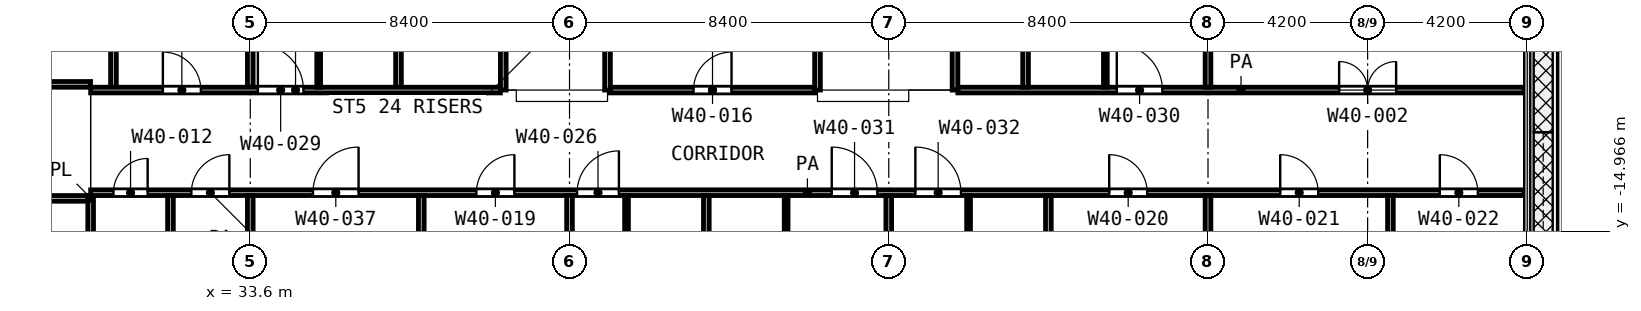
"""IFC4 building model, lengths in metres.
Left out: names, types, materials, properties, quantities, classifications, styles, units other than length and angle.
Written with IfcOpenShell. Run it as: python <this file> out.ifc"""

import sys

from ifc_helpers import new_model, si_unit, direction, frame, frame_2d, origin, place, context, subcontext, project, spatial, rectangle, extrude, element, fill, save


model = new_model("IFC4")
c1 = context("Model", 3, precision=1e-05, world=origin(), true_north=direction((0.0, 1.0)))
c2 = subcontext(c1, "Body", "Model", "MODEL_VIEW")
j1 = project(units=[si_unit("LENGTHUNIT", "METRE"), si_unit("PLANEANGLEUNIT", "RADIAN")], contexts=[c1])
p1 = place(None, origin())
s1 = spatial("IfcSite", under=j1, at=p1, CompositionType="ELEMENT")
p2 = place(p1, origin())
s2 = spatial("IfcBuilding", under=s1, at=p2, CompositionType="ELEMENT")
p3 = place(p2, frame((0.0, 0.0, 175.2)))
s3 = spatial("IfcBuildingStorey", under=s2, at=p3, CompositionType="ELEMENT", Elevation=175.2)
p4 = place(p3, frame((29.4, -14.147, 0.0), z_axis=(0.0, 0.0, 1.0), x_axis=(0.0, 1.0, 0.0)))
e1 = element("IfcWall", 1, at=p4, inside=s3, PredefinedType="PARTITIONING", context=c2, shape_type="SweptSolid", body=[
    extrude(rectangle(XDim=0.12, YDim=0.1, at=frame_2d((0.06, 0.0))), origin(), (0.0, 0.0, 1.0), 3.6),
])
for number, where, z_axis, x_axis in (
    (2, (35.4, -11.175, 0.0), (0.0, 0.0, 1.0), (0.0, 1.0, 0.0)),
    (3, (43.5, -16.65, 0.0), (0.0, 0.0, 1.0), (0.0, 1.0, 0.0)),
    (4, (47.7, -16.65, 0.0), (0.0, 0.0, 1.0), (0.0, 1.0, 0.0)),
    (5, (52.5, -16.65, 0.0), (0.0, 0.0, 1.0), (0.0, 1.0, 0.0)),
    (6, (56.1, -11.175, 0.0), (0.0, 0.0, 1.0), (0.0, 1.0, 0.0)),
):
    element("IfcWall", number, at=place(p3, frame(where, z_axis=z_axis, x_axis=x_axis)), inside=s3, PredefinedType="PARTITIONING", context=c2, shape_type="SweptSolid", body=[
        extrude(rectangle(XDim=2.625, YDim=0.1, at=frame_2d((1.312, 0.0))), origin(), (0.0, 0.0, 1.0), 3.6),
    ])
p5 = place(p3, frame((24.9, -14.1, 0.0), z_axis=(0.0, 0.0, 1.0), x_axis=(1.0, 0.0, 0.0)))
e7 = element("IfcWall", 7, at=p5, inside=s3, PredefinedType="PARTITIONING", context=c2, shape_type="SweptSolid", body=[
    extrude(rectangle(XDim=4.425, YDim=0.15, at=frame_2d((2.212, 0.0))), origin(), (0.0, 0.0, 1.0), 3.6),
])
p6 = place(p5, frame((1.65, 0.0, 0.0)))
e8 = element("IfcOpeningElement", 8, at=p6, cuts=e7, PredefinedType="OPENING", context=c2, shape_type="SweptSolid", body=[
    extrude(rectangle(XDim=1.5, YDim=2.1, at=frame_2d((0.75, 1.05))), frame((0.0, 0.085, 0.0), z_axis=(0.0, -1.0, 0.0), x_axis=(1.0, 0.0, 0.0)), (0.0, 0.0, 1.0), 0.17),
])
p7 = place(p3, frame((29.4, -13.95, 0.0), z_axis=(0.0, 0.0, 1.0), x_axis=(1.0, 0.0, 0.0)))
e9 = element("IfcWall", 9, at=p7, inside=s3, PredefinedType="PARTITIONING", context=c2, shape_type="SweptSolid", body=[
    extrude(rectangle(XDim=37.72, YDim=0.15, at=frame_2d((18.86, 0.0))), origin(), (0.0, 0.0, 1.0), 3.6),
])
p8 = place(p7, frame((10.15, 0.0, 0.0)))
e10 = element("IfcOpeningElement", 10, at=p8, cuts=e9, PredefinedType="OPENING", context=c2, shape_type="SweptSolid", body=[
    extrude(rectangle(XDim=1.0, YDim=2.1, at=frame_2d((0.5, 1.05))), frame((0.0, 0.085, 0.0), z_axis=(0.0, -1.0, 0.0), x_axis=(1.0, 0.0, 0.0)), (0.0, 0.0, 1.0), 0.17),
])
p9 = place(p7, frame((12.8, 0.0, 0.0)))
e11 = element("IfcOpeningElement", 11, at=p9, cuts=e9, PredefinedType="OPENING", context=c2, shape_type="SweptSolid", body=[
    extrude(rectangle(XDim=1.1, YDim=2.1, at=frame_2d((0.55, 1.05))), frame((0.0, 0.085, 0.0), z_axis=(0.0, -1.0, 0.0), x_axis=(1.0, 0.0, 0.0)), (0.0, 0.0, 1.0), 0.17),
])
p10 = place(p7, frame((19.5, 0.0, 0.0)))
e12 = element("IfcOpeningElement", 12, at=p10, cuts=e9, PredefinedType="OPENING", context=c2, shape_type="SweptSolid", body=[
    extrude(rectangle(XDim=1.2, YDim=2.1, at=frame_2d((0.6, 1.05))), frame((0.0, 0.085, 0.0), z_axis=(0.0, -1.0, 0.0), x_axis=(1.0, 0.0, 0.0)), (0.0, 0.0, 1.0), 0.17),
])
p11 = place(p7, frame((21.7, 0.0, 0.0)))
e13 = element("IfcOpeningElement", 13, at=p11, cuts=e9, PredefinedType="OPENING", context=c2, shape_type="SweptSolid", body=[
    extrude(rectangle(XDim=1.2, YDim=2.1, at=frame_2d((0.6, 1.05))), frame((0.0, 0.085, 0.0), z_axis=(0.0, -1.0, 0.0), x_axis=(1.0, 0.0, 0.0)), (0.0, 0.0, 1.0), 0.17),
])
p12 = place(p7, frame((26.8, 0.0, 0.0)))
e14 = element("IfcOpeningElement", 14, at=p12, cuts=e9, PredefinedType="OPENING", context=c2, shape_type="SweptSolid", body=[
    extrude(rectangle(XDim=1.0, YDim=2.1, at=frame_2d((0.5, 1.05))), frame((0.0, 0.085, 0.0), z_axis=(0.0, -1.0, 0.0), x_axis=(1.0, 0.0, 0.0)), (0.0, 0.0, 1.0), 0.17),
])
p13 = place(p7, frame((31.3, 0.0, 0.0)))
e15 = element("IfcOpeningElement", 15, at=p13, cuts=e9, PredefinedType="OPENING", context=c2, shape_type="SweptSolid", body=[
    extrude(rectangle(XDim=1.0, YDim=2.1, at=frame_2d((0.5, 1.05))), frame((0.0, 0.085, 0.0), z_axis=(0.0, -1.0, 0.0), x_axis=(1.0, 0.0, 0.0)), (0.0, 0.0, 1.0), 0.17),
])
p14 = place(p7, frame((35.5, 0.0, 0.0)))
e16 = element("IfcOpeningElement", 16, at=p14, cuts=e9, PredefinedType="OPENING", context=c2, shape_type="SweptSolid", body=[
    extrude(rectangle(XDim=1.0, YDim=2.1, at=frame_2d((0.5, 1.05))), frame((0.0, 0.085, 0.0), z_axis=(0.0, -1.0, 0.0), x_axis=(1.0, 0.0, 0.0)), (0.0, 0.0, 1.0), 0.17),
])
p15 = place(p7, frame((0.6, 0.0, 0.0)))
e17 = element("IfcOpeningElement", 17, at=p15, cuts=e9, PredefinedType="OPENING", context=c2, shape_type="SweptSolid", body=[
    extrude(rectangle(XDim=0.9, YDim=2.1, at=frame_2d((0.45, 1.05))), frame((0.0, 0.085, 0.0), z_axis=(0.0, -1.0, 0.0), x_axis=(1.0, 0.0, 0.0)), (0.0, 0.0, 1.0), 0.17),
])
p16 = place(p7, frame((2.65, 0.0, 0.0)))
e18 = element("IfcOpeningElement", 18, at=p16, cuts=e9, PredefinedType="OPENING", context=c2, shape_type="SweptSolid", body=[
    extrude(rectangle(XDim=1.0, YDim=2.1, at=frame_2d((0.5, 1.05))), frame((0.0, 0.085, 0.0), z_axis=(0.0, -1.0, 0.0), x_axis=(1.0, 0.0, 0.0)), (0.0, 0.0, 1.0), 0.17),
])
p17 = place(p7, frame((5.85, 0.0, 0.0)))
e19 = element("IfcOpeningElement", 19, at=p17, cuts=e9, PredefinedType="OPENING", context=c2, shape_type="SweptSolid", body=[
    extrude(rectangle(XDim=1.2, YDim=2.1, at=frame_2d((0.6, 1.05))), frame((0.0, 0.085, 0.0), z_axis=(0.0, -1.0, 0.0), x_axis=(1.0, 0.0, 0.0)), (0.0, 0.0, 1.0), 0.17),
])
p18 = place(p3, frame((29.4, -11.25, 0.0), z_axis=(0.0, 0.0, 1.0), x_axis=(1.0, 0.0, 0.0)))
e20 = element("IfcWall", 20, at=p18, inside=s3, PredefinedType="PARTITIONING", context=c2, shape_type="SweptSolid", body=[
    extrude(rectangle(XDim=10.782, YDim=0.15, at=frame_2d((5.391, 0.0))), origin(), (0.0, 0.0, 1.0), 3.6),
])
p19 = place(p18, frame((1.9, 0.0, 0.0)))
e21 = element("IfcOpeningElement", 21, at=p19, cuts=e20, PredefinedType="OPENING", context=c2, shape_type="SweptSolid", body=[
    extrude(rectangle(XDim=1.0, YDim=2.1, at=frame_2d((0.5, 1.05))), frame((0.0, 0.085, 0.0), z_axis=(0.0, -1.0, 0.0), x_axis=(1.0, 0.0, 0.0)), (0.0, 0.0, 1.0), 0.17),
])
p20 = place(p18, frame((4.4, 0.0, 0.0)))
e22 = element("IfcOpeningElement", 22, at=p20, cuts=e20, PredefinedType="OPENING", context=c2, shape_type="SweptSolid", body=[
    extrude(rectangle(XDim=1.2, YDim=2.1, at=frame_2d((0.6, 1.05))), frame((0.0, 0.085, 0.0), z_axis=(0.0, -1.0, 0.0), x_axis=(1.0, 0.0, 0.0)), (0.0, 0.0, 1.0), 0.17),
])
p21 = place(p3, frame((43.075, -11.25, 0.0), z_axis=(0.0, 0.0, 1.0), x_axis=(1.0, 0.0, 0.0)))
e23 = element("IfcWall", 23, at=p21, inside=s3, PredefinedType="PARTITIONING", context=c2, shape_type="SweptSolid", body=[
    extrude(rectangle(XDim=5.375, YDim=0.15, at=frame_2d((2.688, 0.0))), origin(), (0.0, 0.0, 1.0), 3.6),
])
p22 = place(p21, frame((2.188, 0.0, 0.0)))
e24 = element("IfcOpeningElement", 24, at=p22, cuts=e23, PredefinedType="OPENING", context=c2, shape_type="SweptSolid", body=[
    extrude(rectangle(XDim=1.0, YDim=2.1, at=frame_2d((0.5, 1.05))), frame((0.0, 0.085, 0.0), z_axis=(0.0, -1.0, 0.0), x_axis=(1.0, 0.0, 0.0)), (0.0, 0.0, 1.0), 0.17),
])
p23 = place(p3, frame((52.218, -11.25, 0.0), z_axis=(0.0, 0.0, 1.0), x_axis=(1.0, 0.0, 0.0)))
e25 = element("IfcWall", 25, at=p23, inside=s3, PredefinedType="PARTITIONING", context=c2, shape_type="SweptSolid", body=[
    extrude(rectangle(XDim=14.902, YDim=0.15, at=frame_2d((7.451, 0.0))), origin(), (0.0, 0.0, 1.0), 3.6),
])
p24 = place(p23, frame((4.182, 0.0, 0.0)))
e26 = element("IfcOpeningElement", 26, at=p24, cuts=e25, PredefinedType="OPENING", context=c2, shape_type="SweptSolid", body=[
    extrude(rectangle(XDim=1.2, YDim=2.1, at=frame_2d((0.6, 1.05))), frame((0.0, 0.085, 0.0), z_axis=(0.0, -1.0, 0.0), x_axis=(1.0, 0.0, 0.0)), (0.0, 0.0, 1.0), 0.17),
])
p25 = place(p23, frame((10.032, 0.0, 0.0)))
e27 = element("IfcOpeningElement", 27, at=p25, cuts=e25, PredefinedType="OPENING", context=c2, shape_type="SweptSolid", body=[
    extrude(rectangle(XDim=1.5, YDim=2.1, at=frame_2d((0.75, 1.05))), frame((0.0, 0.085, 0.0), z_axis=(0.0, -1.0, 0.0), x_axis=(1.0, 0.0, 0.0)), (0.0, 0.0, 1.0), 0.17),
])
p26 = place(p3, frame((24.9, -11.1, 0.0), z_axis=(0.0, 0.0, 1.0), x_axis=(1.0, 0.0, 0.0)))
e28 = element("IfcWall", 28, at=p26, inside=s3, PredefinedType="PARTITIONING", context=c2, shape_type="SweptSolid", body=[
    extrude(rectangle(XDim=4.498, YDim=0.15, at=frame_2d((2.249, 0.0))), origin(), (0.0, 0.0, 1.0), 3.6),
])
p27 = place(p26, frame((1.799, 0.0, 0.0)))
e29 = element("IfcOpeningElement", 29, at=p27, cuts=e28, PredefinedType="OPENING", context=c2, shape_type="SweptSolid", body=[
    extrude(rectangle(XDim=1.2, YDim=2.1, at=frame_2d((0.6, 1.05))), frame((0.0, 0.085, 0.0), z_axis=(0.0, -1.0, 0.0), x_axis=(1.0, 0.0, 0.0)), (0.0, 0.0, 1.0), 0.17),
])
p28 = place(p3, frame((29.4, -31.198, 0.0), z_axis=(0.0, 0.0, 1.0), x_axis=(0.0, 1.0, 0.0)))
e30 = element("IfcWall", 30, at=p28, inside=s3, PredefinedType="PARTITIONING", context=c2, shape_type="SweptSolid", body=[
    extrude(rectangle(XDim=17.098, YDim=0.15, at=frame_2d((8.549, 0.0))), origin(), (0.0, 0.0, 1.0), 3.6),
])
p29 = place(p3, frame((30.0, -11.175, 0.0), z_axis=(0.0, 0.0, 1.0), x_axis=(0.0, 1.0, 0.0)))
e31 = element("IfcWall", 31, at=p29, inside=s3, PredefinedType="PARTITIONING", context=c2, shape_type="SweptSolid", body=[
    extrude(rectangle(XDim=11.095, YDim=0.15, at=frame_2d((5.547, 0.0))), origin(), (0.0, 0.0, 1.0), 2.7),
])
p30 = place(p3, frame((31.5, -24.698, 0.0), z_axis=(0.0, 0.0, 1.0), x_axis=(0.0, 1.0, 0.0)))
e32 = element("IfcWall", 32, at=p30, inside=s3, PredefinedType="PARTITIONING", context=c2, shape_type="SweptSolid", body=[
    extrude(rectangle(XDim=10.673, YDim=0.15, at=frame_2d((5.336, 0.0))), origin(), (0.0, 0.0, 1.0), 3.6),
])
p31 = place(p3, frame((33.6, -16.3, 0.0), z_axis=(0.0, 0.0, 1.0), x_axis=(0.0, 1.0, 0.0)))
e33 = element("IfcWall", 33, at=p31, inside=s3, PredefinedType="PARTITIONING", context=c2, shape_type="SweptSolid", body=[
    extrude(rectangle(XDim=2.275, YDim=0.15, at=frame_2d((1.138, 0.0))), origin(), (0.0, 0.0, 1.0), 3.6),
])
p32 = place(p3, frame((33.6, -11.175, 0.0), z_axis=(0.0, 0.0, 1.0), x_axis=(0.0, 1.0, 0.0)))
e34 = element("IfcWall", 34, at=p32, inside=s3, PredefinedType="PARTITIONING", context=c2, shape_type="SweptSolid", body=[
    extrude(rectangle(XDim=11.095, YDim=0.15, at=frame_2d((5.547, 0.0))), origin(), (0.0, 0.0, 1.0), 3.6),
])
p33 = place(p3, frame((37.5, -11.175, 0.0), z_axis=(0.0, 0.0, 1.0), x_axis=(0.0, 1.0, 0.0)))
e35 = element("IfcWall", 35, at=p33, inside=s3, PredefinedType="PARTITIONING", context=c2, shape_type="SweptSolid", body=[
    extrude(rectangle(XDim=11.095, YDim=0.15, at=frame_2d((5.547, 0.0))), origin(), (0.0, 0.0, 1.0), 2.7),
])
p34 = place(p3, frame((38.1, -31.12, 0.0), z_axis=(0.0, 0.0, 1.0), x_axis=(0.0, 1.0, 0.0)))
e36 = element("IfcWall", 36, at=p34, inside=s3, PredefinedType="PARTITIONING", context=c2, shape_type="SweptSolid", body=[
    extrude(rectangle(XDim=17.095, YDim=0.15, at=frame_2d((8.548, 0.0))), origin(), (0.0, 0.0, 1.0), 3.6),
])
p35 = place(p3, frame((40.257, -11.25, 0.0), z_axis=(0.0, 0.0, 1.0), x_axis=(0.0, 1.0, 0.0)))
e37 = element("IfcWall", 37, at=p35, inside=s3, PredefinedType="PARTITIONING", context=c2, shape_type="SweptSolid", body=[
    extrude(rectangle(XDim=11.17, YDim=0.15, at=frame_2d((5.585, 0.0))), origin(), (0.0, 0.0, 1.0), 2.7),
])
p36 = place(p35, frame((5.125, 0.0, 0.0)))
e38 = element("IfcOpeningElement", 38, at=p36, cuts=e37, PredefinedType="OPENING", context=c2, shape_type="SweptSolid", body=[
    extrude(rectangle(XDim=1.0, YDim=2.1, at=frame_2d((0.5, 1.05))), frame((0.0, 0.085, 0.0), z_axis=(0.0, -1.0, 0.0), x_axis=(1.0, 0.0, 0.0)), (0.0, 0.0, 1.0), 0.17),
])
p37 = place(p3, frame((42.0, -31.12, 0.0), z_axis=(0.0, 0.0, 1.0), x_axis=(0.0, 1.0, 0.0)))
e39 = element("IfcWall", 39, at=p37, inside=s3, PredefinedType="PARTITIONING", context=c2, shape_type="SweptSolid", body=[
    extrude(rectangle(XDim=17.095, YDim=0.15, at=frame_2d((8.548, 0.0))), origin(), (0.0, 0.0, 1.0), 3.6),
])
p38 = place(p3, frame((43.0, -11.25, 0.0), z_axis=(0.0, 0.0, 1.0), x_axis=(0.0, 1.0, 0.0)))
e40 = element("IfcWall", 40, at=p38, inside=s3, PredefinedType="PARTITIONING", context=c2, shape_type="SweptSolid", body=[
    extrude(rectangle(XDim=2.348, YDim=0.15, at=frame_2d((1.174, 0.0))), origin(), (0.0, 0.0, 1.0), 3.6),
])
p39 = place(p3, frame((45.6, -31.12, 0.0), z_axis=(0.0, 0.0, 1.0), x_axis=(0.0, 1.0, 0.0)))
e41 = element("IfcWall", 41, at=p39, inside=s3, PredefinedType="PARTITIONING", context=c2, shape_type="SweptSolid", body=[
    extrude(rectangle(XDim=17.095, YDim=0.15, at=frame_2d((8.548, 0.0))), origin(), (0.0, 0.0, 1.0), 3.6),
])
p40 = place(p3, frame((48.525, -11.25, 0.0), z_axis=(0.0, 0.0, 1.0), x_axis=(0.0, 1.0, 0.0)))
e42 = element("IfcWall", 42, at=p40, inside=s3, PredefinedType="PARTITIONING", context=c2, shape_type="SweptSolid", body=[
    extrude(rectangle(XDim=2.6, YDim=0.15, at=frame_2d((1.3, 0.0))), origin(), (0.0, 0.0, 1.0), 3.6),
])
p41 = place(p3, frame((50.4, -31.12, 0.0), z_axis=(0.0, 0.0, 1.0), x_axis=(0.0, 1.0, 0.0)))
e43 = element("IfcWall", 43, at=p41, inside=s3, PredefinedType="PARTITIONING", context=c2, shape_type="SweptSolid", body=[
    extrude(rectangle(XDim=17.095, YDim=0.15, at=frame_2d((8.548, 0.0))), origin(), (0.0, 0.0, 1.0), 3.6),
])
p42 = place(p3, frame((52.143, -11.25, 0.0), z_axis=(0.0, 0.0, 1.0), x_axis=(0.0, 1.0, 0.0)))
e44 = element("IfcWall", 44, at=p42, inside=s3, PredefinedType="PARTITIONING", context=c2, shape_type="SweptSolid", body=[
    extrude(rectangle(XDim=11.17, YDim=0.15, at=frame_2d((5.585, 0.0))), origin(), (0.0, 0.0, 1.0), 2.7),
])
p43 = place(p42, frame((4.2, 0.0, 0.0)))
e45 = element("IfcOpeningElement", 45, at=p43, cuts=e44, PredefinedType="OPENING", context=c2, shape_type="SweptSolid", body=[
    extrude(rectangle(XDim=1.0, YDim=2.1, at=frame_2d((0.5, 1.05))), frame((0.0, 0.085, 0.0), z_axis=(0.0, -1.0, 0.0), x_axis=(1.0, 0.0, 0.0)), (0.0, 0.0, 1.0), 0.17),
])
p44 = place(p3, frame((54.0, -11.175, 0.0), z_axis=(0.0, 0.0, 1.0), x_axis=(0.0, 1.0, 0.0)))
e46 = element("IfcWall", 46, at=p44, inside=s3, PredefinedType="PARTITIONING", context=c2, shape_type="SweptSolid", body=[
    extrude(rectangle(XDim=11.095, YDim=0.15, at=frame_2d((5.547, 0.0))), origin(), (0.0, 0.0, 1.0), 2.7),
])
for number, where, z_axis, x_axis in (
    (47, (54.6, -31.12, 0.0), (0.0, 0.0, 1.0), (0.0, 1.0, 0.0)),
    (48, (58.8, -31.12, 0.0), (0.0, 0.0, 1.0), (0.0, 1.0, 0.0)),
):
    element("IfcWall", number, at=place(p3, frame(where, z_axis=z_axis, x_axis=x_axis)), inside=s3, PredefinedType="PARTITIONING", context=c2, shape_type="SweptSolid", body=[
        extrude(rectangle(XDim=17.095, YDim=0.15, at=frame_2d((8.548, 0.0))), origin(), (0.0, 0.0, 1.0), 3.6),
    ])
p45 = place(p3, frame((58.8, -11.175, 0.0), z_axis=(0.0, 0.0, 1.0), x_axis=(0.0, 1.0, 0.0)))
e49 = element("IfcWall", 49, at=p45, inside=s3, PredefinedType="PARTITIONING", context=c2, shape_type="SweptSolid", body=[
    extrude(rectangle(XDim=11.095, YDim=0.15, at=frame_2d((5.547, 0.0))), origin(), (0.0, 0.0, 1.0), 2.7),
])
p46 = place(p3, frame((63.6, -28.687, 0.0), z_axis=(0.0, 0.0, 1.0), x_axis=(0.0, 1.0, 0.0)))
e50 = element("IfcWall", 50, at=p46, inside=s3, PredefinedType="PARTITIONING", context=c2, shape_type="SweptSolid", body=[
    extrude(rectangle(XDim=14.662, YDim=0.15, at=frame_2d((7.331, 0.0))), origin(), (0.0, 0.0, 1.0), 3.6),
])
p47 = place(p19, origin())
e51 = element("IfcDoor", 51, at=p47, inside=s3, OperationType="SINGLE_SWING_LEFT", PredefinedType="DOOR", context=c2, shape_type="SweptSolid", body=[
    extrude(rectangle(XDim=1.0, YDim=2.1, at=frame_2d((0.5, 1.05))), frame((0.0, 0.025, 0.0), z_axis=(0.0, -1.0, 0.0), x_axis=(1.0, 0.0, 0.0)), (0.0, 0.0, 1.0), 0.05),
])
fill(e21, e51)
p48 = place(p20, origin())
e52 = element("IfcDoor", 52, at=p48, inside=s3, OperationType="SINGLE_SWING_LEFT", PredefinedType="DOOR", context=c2, shape_type="SweptSolid", body=[
    extrude(rectangle(XDim=1.2, YDim=2.1, at=frame_2d((0.6, 1.05))), frame((0.0, 0.025, 0.0), z_axis=(0.0, -1.0, 0.0), x_axis=(1.0, 0.0, 0.0)), (0.0, 0.0, 1.0), 0.05),
])
fill(e22, e52)
p49 = place(p22, origin())
e53 = element("IfcDoor", 53, at=p49, inside=s3, OperationType="SINGLE_SWING_RIGHT", PredefinedType="DOOR", context=c2, shape_type="SweptSolid", body=[
    extrude(rectangle(XDim=1.0, YDim=2.1, at=frame_2d((0.5, 1.05))), frame((0.0, 0.025, 0.0), z_axis=(0.0, -1.0, 0.0), x_axis=(1.0, 0.0, 0.0)), (0.0, 0.0, 1.0), 0.05),
])
fill(e24, e53)
p50 = place(p24, origin())
e54 = element("IfcDoor", 54, at=p50, inside=s3, OperationType="SINGLE_SWING_LEFT", PredefinedType="DOOR", context=c2, shape_type="SweptSolid", body=[
    extrude(rectangle(XDim=1.2, YDim=2.1, at=frame_2d((0.6, 1.05))), frame((0.0, 0.025, 0.0), z_axis=(0.0, -1.0, 0.0), x_axis=(1.0, 0.0, 0.0)), (0.0, 0.0, 1.0), 0.05),
])
fill(e26, e54)
p51 = place(p25, origin())
e55 = element("IfcDoor", 55, at=p51, inside=s3, OperationType="DOUBLE_DOOR_SINGLE_SWING", PredefinedType="DOOR", context=c2, shape_type="SweptSolid", body=[
    extrude(rectangle(XDim=1.5, YDim=2.1, at=frame_2d((0.75, 1.05))), frame((0.0, 0.025, 0.0), z_axis=(0.0, -1.0, 0.0), x_axis=(1.0, 0.0, 0.0)), (0.0, 0.0, 1.0), 0.05),
])
fill(e27, e55)
p52 = place(p8, origin())
e56 = element("IfcDoor", 56, at=p52, inside=s3, OperationType="SINGLE_SWING_RIGHT", PredefinedType="DOOR", context=c2, shape_type="SweptSolid", body=[
    extrude(rectangle(XDim=1.0, YDim=2.1, at=frame_2d((0.5, 1.05))), frame((0.0, 0.025, 0.0), z_axis=(0.0, -1.0, 0.0), x_axis=(1.0, 0.0, 0.0)), (0.0, 0.0, 1.0), 0.05),
])
fill(e10, e56)
p53 = place(p9, origin())
e57 = element("IfcDoor", 57, at=p53, inside=s3, OperationType="SINGLE_SWING_RIGHT", PredefinedType="DOOR", context=c2, shape_type="SweptSolid", body=[
    extrude(rectangle(XDim=1.1, YDim=2.1, at=frame_2d((0.55, 1.05))), frame((0.0, 0.025, 0.0), z_axis=(0.0, -1.0, 0.0), x_axis=(1.0, 0.0, 0.0)), (0.0, 0.0, 1.0), 0.05),
])
fill(e11, e57)
p54 = place(p10, origin())
e58 = element("IfcDoor", 58, at=p54, inside=s3, OperationType="SINGLE_SWING_LEFT", PredefinedType="DOOR", context=c2, shape_type="SweptSolid", body=[
    extrude(rectangle(XDim=1.2, YDim=2.1, at=frame_2d((0.6, 1.05))), frame((0.0, 0.025, 0.0), z_axis=(0.0, -1.0, 0.0), x_axis=(1.0, 0.0, 0.0)), (0.0, 0.0, 1.0), 0.05),
])
fill(e12, e58)
p55 = place(p11, origin())
e59 = element("IfcDoor", 59, at=p55, inside=s3, OperationType="SINGLE_SWING_LEFT", PredefinedType="DOOR", context=c2, shape_type="SweptSolid", body=[
    extrude(rectangle(XDim=1.2, YDim=2.1, at=frame_2d((0.6, 1.05))), frame((0.0, 0.025, 0.0), z_axis=(0.0, -1.0, 0.0), x_axis=(1.0, 0.0, 0.0)), (0.0, 0.0, 1.0), 0.05),
])
fill(e13, e59)
p56 = place(p12, origin())
e60 = element("IfcDoor", 60, at=p56, inside=s3, OperationType="SINGLE_SWING_LEFT", PredefinedType="DOOR", context=c2, shape_type="SweptSolid", body=[
    extrude(rectangle(XDim=1.0, YDim=2.1, at=frame_2d((0.5, 1.05))), frame((0.0, 0.025, 0.0), z_axis=(0.0, -1.0, 0.0), x_axis=(1.0, 0.0, 0.0)), (0.0, 0.0, 1.0), 0.05),
])
fill(e14, e60)
p57 = place(p13, origin())
e61 = element("IfcDoor", 61, at=p57, inside=s3, OperationType="SINGLE_SWING_LEFT", PredefinedType="DOOR", context=c2, shape_type="SweptSolid", body=[
    extrude(rectangle(XDim=1.0, YDim=2.1, at=frame_2d((0.5, 1.05))), frame((0.0, 0.025, 0.0), z_axis=(0.0, -1.0, 0.0), x_axis=(1.0, 0.0, 0.0)), (0.0, 0.0, 1.0), 0.05),
])
fill(e15, e61)
p58 = place(p14, origin())
e62 = element("IfcDoor", 62, at=p58, inside=s3, OperationType="SINGLE_SWING_LEFT", PredefinedType="DOOR", context=c2, shape_type="SweptSolid", body=[
    extrude(rectangle(XDim=1.0, YDim=2.1, at=frame_2d((0.5, 1.05))), frame((0.0, 0.025, 0.0), z_axis=(0.0, -1.0, 0.0), x_axis=(1.0, 0.0, 0.0)), (0.0, 0.0, 1.0), 0.05),
])
fill(e16, e62)
p59 = place(p15, origin())
e63 = element("IfcDoor", 63, at=p59, inside=s3, OperationType="SINGLE_SWING_RIGHT", PredefinedType="DOOR", context=c2, shape_type="SweptSolid", body=[
    extrude(rectangle(XDim=0.9, YDim=2.1, at=frame_2d((0.45, 1.05))), frame((0.0, 0.025, 0.0), z_axis=(0.0, -1.0, 0.0), x_axis=(1.0, 0.0, 0.0)), (0.0, 0.0, 1.0), 0.05),
])
fill(e17, e63)
p60 = place(p16, origin())
e64 = element("IfcDoor", 64, at=p60, inside=s3, OperationType="SINGLE_SWING_RIGHT", PredefinedType="DOOR", context=c2, shape_type="SweptSolid", body=[
    extrude(rectangle(XDim=1.0, YDim=2.1, at=frame_2d((0.5, 1.05))), frame((0.0, 0.025, 0.0), z_axis=(0.0, -1.0, 0.0), x_axis=(1.0, 0.0, 0.0)), (0.0, 0.0, 1.0), 0.05),
])
fill(e18, e64)
p61 = place(p17, origin())
e65 = element("IfcDoor", 65, at=p61, inside=s3, OperationType="SINGLE_SWING_RIGHT", PredefinedType="DOOR", context=c2, shape_type="SweptSolid", body=[
    extrude(rectangle(XDim=1.2, YDim=2.1, at=frame_2d((0.6, 1.05))), frame((0.0, 0.025, 0.0), z_axis=(0.0, -1.0, 0.0), x_axis=(1.0, 0.0, 0.0)), (0.0, 0.0, 1.0), 0.05),
])
fill(e19, e65)
save(model, sys.argv[1])
